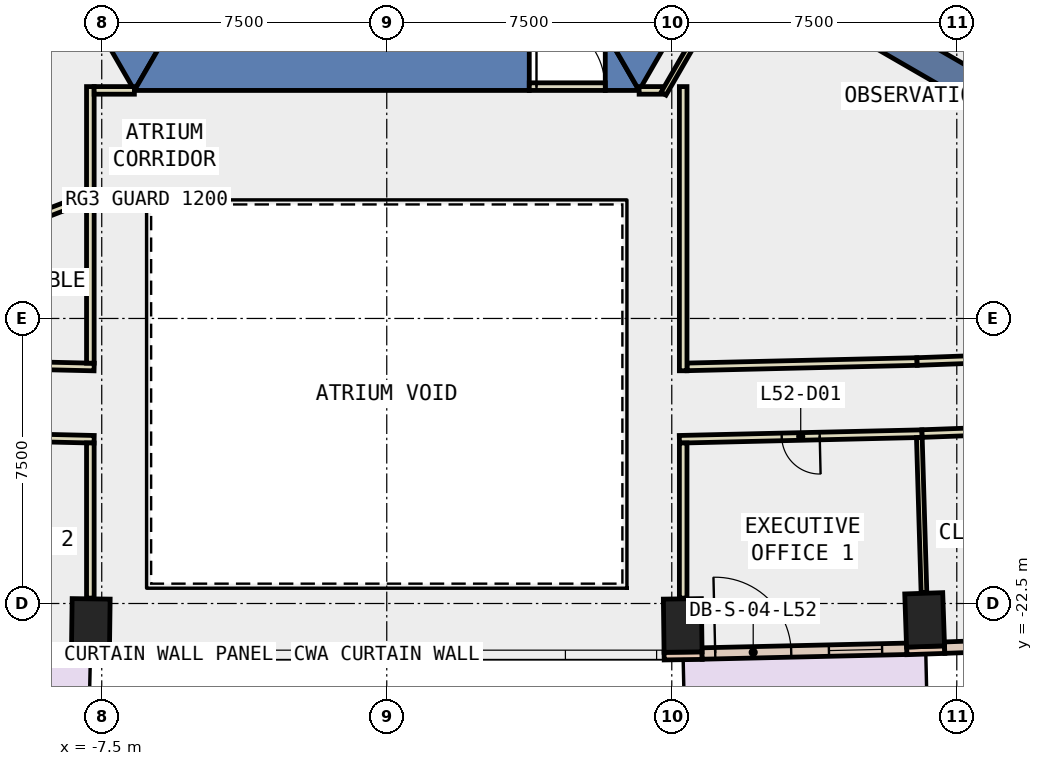
"""IFC4 building model, lengths in metres.
Left out: names, types, materials, properties, quantities, classifications, styles, units other than length and angle.
Written with IfcOpenShell. Run it as: python <this file> out.ifc"""

import sys

from ifc_helpers import new_model, si_unit, direction, frame, frame_2d, origin, origin_2d, place, context, subcontext, project, spatial, polyline, rectangle, outline, extrude, element, fill, save


model = new_model("IFC4")
c1 = context("Model", 3, precision=1e-05, world=origin(), true_north=direction((0.0, 1.0)))
c2 = subcontext(c1, "Body", "Model", "MODEL_VIEW")
j1 = project(units=[si_unit("LENGTHUNIT", "METRE"), si_unit("PLANEANGLEUNIT", "RADIAN")], contexts=[c1])
p1 = place(None, origin())
s1 = spatial("IfcSite", under=j1, at=p1, CompositionType="ELEMENT")
p2 = place(p1, origin())
s2 = spatial("IfcBuilding", under=s1, at=p2, CompositionType="ELEMENT")
p3 = place(p2, frame((0.0, 0.0, 231.8)))
s3 = spatial("IfcBuildingStorey", under=s2, at=p3, CompositionType="ELEMENT", Elevation=231.8)
for number, where, z_axis, x_axis in (
    (1, (-7.788, -23.078, -0.4), (0.0, 0.0, 1.0), (-1.0, 0.013, 0.0)),
    (2, (7.788, -23.078, -0.4), (0.0, 0.0, 1.0), (1.0, 0.013, 0.0)),
    (3, (14.154, -22.931, -0.4), (0.0, 0.0, 1.0), (0.999, 0.034, 0.0)),
):
    element("IfcColumn", number, at=place(p3, frame(where, z_axis=z_axis, x_axis=x_axis)), inside=s3, PredefinedType="COLUMN", context=c2, shape_type="SweptSolid", body=[
        extrude(rectangle(XDim=1.0, YDim=1.4, at=origin_2d()), origin(), (0.0, 0.0, 1.0), 4.0),
    ])
p4 = place(p3, frame((0.0, 0.0, -0.4)))
e4 = element("IfcWall", 4, at=p4, inside=s3, PredefinedType="SHEAR", context=c2, shape_type="SweptSolid", body=[
    extrude(outline(polyline([(-13.279, 2.5), (-6.64, -9.0), (-5.831, -7.6), (-11.662, 2.5), (-13.279, 2.5)])), origin(), (0.0, 0.0, 1.0), 4.0),
])
p5 = place(p3, frame((0.0, 0.0, -0.4)))
e5 = element("IfcWall", 5, at=p5, inside=s3, PredefinedType="SHEAR", context=c2, shape_type="SweptSolid", body=[
    extrude(outline(polyline([(3.75, -9.0), (3.75, -7.6), (-5.831, -7.6), (-6.64, -9.0), (3.75, -9.0)])), origin(), (0.0, 0.0, 1.0), 4.0),
])
p6 = place(p3, frame((0.0, 0.0, -0.4)))
e6 = element("IfcWall", 6, at=p6, inside=s3, PredefinedType="SHEAR", context=c2, shape_type="SweptSolid", body=[
    extrude(outline(polyline([(5.75, -7.6), (5.75, -9.0), (6.64, -9.0), (5.831, -7.6), (5.75, -7.6)])), origin(), (0.0, 0.0, 1.0), 4.0),
])
p7 = place(p3, frame((0.0, 0.0, -0.4)))
e7 = element("IfcWall", 7, at=p7, inside=s3, PredefinedType="SHEAR", context=c2, shape_type="SweptSolid", body=[
    extrude(outline(polyline([(6.64, -9.0), (13.279, 2.5), (11.662, 2.5), (5.831, -7.6), (6.64, -9.0)])), origin(), (0.0, 0.0, 1.0), 4.0),
])
for number, where, z_axis, x_axis in (
    (8, (8.877, -5.125, -0.4), (0.0, 0.0, 1.0), (0.866, -0.5, 0.0)),
    (9, (-8.877, -5.125, -0.4), (0.0, 0.0, 1.0), (-0.866, -0.5, 0.0)),
):
    element("IfcWall", number, at=place(p3, frame(where, z_axis=z_axis, x_axis=x_axis)), inside=s3, PredefinedType="SHEAR", context=c2, shape_type="SweptSolid", body=[
        extrude(rectangle(XDim=9.0, YDim=0.8, at=frame_2d((4.5, 0.0))), origin(), (0.0, 0.0, 1.0), 4.0),
    ])
for number, where, z_axis, x_axis in (
    (10, (-8.299, -23.871, 0.0), (0.0, 0.0, 1.0), (1.0, -0.014, 0.0)),
    (11, (7.299, -23.885, 0.0), (0.0, 0.0, 1.0), (1.0, 0.014, 0.0)),
):
    element("IfcWall", number, at=place(p3, frame(where, z_axis=z_axis, x_axis=x_axis)), inside=s3, PredefinedType="STANDARD", context=c2, shape_type="SweptSolid", body=[
        extrude(rectangle(XDim=1.0, YDim=0.2, at=frame_2d((0.5, 0.0))), origin(), (0.0, 0.0, 1.0), 3.6),
    ])
p8 = place(p3, frame((13.682, -23.747, 0.0), z_axis=(0.0, 0.0, 1.0), x_axis=(0.999415245245, 0.034193092457, 0.0)))
e12 = element("IfcWall", 12, at=p8, inside=s3, PredefinedType="STANDARD", context=c2, shape_type="SweptSolid", body=[
    extrude(rectangle(XDim=1.0, YDim=0.2, at=frame_2d((0.5, 0.0))), origin(), (0.0, 0.0, 1.0), 3.6),
])
p9 = place(p3, frame((-13.681, -23.692, 0.0), z_axis=(0.0, 0.0, 1.0), x_axis=(0.999734766333, -0.023030349233, 0.0)))
e13 = element("IfcWall", 13, at=p9, inside=s3, PredefinedType="STANDARD", context=c2, shape_type="SweptSolid", body=[
    extrude(rectangle(XDim=5.385, YDim=0.3, at=frame_2d((2.693, 0.0))), origin(), (0.0, 0.0, 1.0), 3.6),
])
p10 = place(p9, frame((0.346, 0.0, 0.0)))
e14 = element("IfcOpeningElement", 14, at=p10, cuts=e13, PredefinedType="OPENING", context=c2, shape_type="SweptSolid", body=[
    extrude(rectangle(XDim=2.0, YDim=2.4, at=frame_2d((1.0, 1.2))), frame((0.0, 0.16, 0.0), z_axis=(0.0, -1.0, 0.0), x_axis=(1.0, 0.0, 0.0)), (0.0, 0.0, 1.0), 0.32),
])
p11 = place(p9, frame((3.339, 0.0, 0.9)))
e15 = element("IfcOpeningElement", 15, at=p11, cuts=e13, PredefinedType="OPENING", context=c2, shape_type="SweptSolid", body=[
    extrude(rectangle(XDim=1.4, YDim=2.6, at=frame_2d((0.7, 1.3))), frame((0.0, 0.16, 0.0), z_axis=(0.0, -1.0, 0.0), x_axis=(1.0, 0.0, 0.0)), (0.0, 0.0, 1.0), 0.32),
])
p12 = place(p3, frame((8.297, -23.816, 0.0), z_axis=(0.0, 0.0, 1.0), x_axis=(0.999734766333, 0.023030349233, 0.0)))
e16 = element("IfcWall", 16, at=p12, inside=s3, PredefinedType="STANDARD", context=c2, shape_type="SweptSolid", body=[
    extrude(rectangle(XDim=5.385, YDim=0.3, at=frame_2d((2.693, 0.0))), origin(), (0.0, 0.0, 1.0), 3.6),
])
p13 = place(p12, frame((0.346, 0.0, 0.0)))
e17 = element("IfcOpeningElement", 17, at=p13, cuts=e16, PredefinedType="OPENING", context=c2, shape_type="SweptSolid", body=[
    extrude(rectangle(XDim=2.0, YDim=2.4, at=frame_2d((1.0, 1.2))), frame((0.0, 0.16, 0.0), z_axis=(0.0, -1.0, 0.0), x_axis=(1.0, 0.0, 0.0)), (0.0, 0.0, 1.0), 0.32),
])
p14 = place(p12, frame((3.339, 0.0, 0.9)))
e18 = element("IfcOpeningElement", 18, at=p14, cuts=e16, PredefinedType="OPENING", context=c2, shape_type="SweptSolid", body=[
    extrude(rectangle(XDim=1.4, YDim=2.6, at=frame_2d((0.7, 1.3))), frame((0.0, 0.16, 0.0), z_axis=(0.0, -1.0, 0.0), x_axis=(1.0, 0.0, 0.0)), (0.0, 0.0, 1.0), 0.32),
])
p15 = place(p3, frame((14.679, -23.662, 0.0), z_axis=(0.0, 0.0, 1.0), x_axis=(0.999318693414, 0.036907302717, 0.0)))
e19 = element("IfcWall", 19, at=p15, inside=s3, PredefinedType="STANDARD", context=c2, shape_type="SweptSolid", body=[
    extrude(rectangle(XDim=5.365, YDim=0.3, at=frame_2d((2.682, 0.0))), origin(), (0.0, 0.0, 1.0), 3.6),
])
p16 = place(p15, frame((0.641, 0.0, 0.9)))
e20 = element("IfcOpeningElement", 20, at=p16, cuts=e19, PredefinedType="OPENING", context=c2, shape_type="SweptSolid", body=[
    extrude(rectangle(XDim=1.4, YDim=2.6, at=frame_2d((0.7, 1.3))), frame((0.0, 0.16, 0.0), z_axis=(0.0, -1.0, 0.0), x_axis=(1.0, 0.0, 0.0)), (0.0, 0.0, 1.0), 0.32),
])
p17 = place(p15, frame((3.323, 0.0, 0.9)))
e21 = element("IfcOpeningElement", 21, at=p17, cuts=e19, PredefinedType="OPENING", context=c2, shape_type="SweptSolid", body=[
    extrude(rectangle(XDim=1.4, YDim=2.6, at=frame_2d((0.7, 1.3))), frame((0.0, 0.16, 0.0), z_axis=(0.0, -1.0, 0.0), x_axis=(1.0, 0.0, 0.0)), (0.0, 0.0, 1.0), 0.32),
])
p18 = place(p3, frame((7.9, -16.274, 0.0), z_axis=(0.0, 0.0, 1.0), x_axis=(0.999729409829, 0.023261709391, 0.0)))
e22 = element("IfcWall", 22, at=p18, inside=s3, PredefinedType="PARTITIONING", context=c2, shape_type="SweptSolid", body=[
    extrude(rectangle(XDim=6.056, YDim=0.2, at=frame_2d((3.028, 0.0))), origin(), (0.0, 0.0, 1.0), 3.6),
])
p19 = place(p3, frame((13.954, -16.133, 0.0), z_axis=(0.0, 0.0, 1.0), x_axis=(0.999323686931, 0.036771847101, 0.0)))
e23 = element("IfcWall", 23, at=p19, inside=s3, PredefinedType="PARTITIONING", context=c2, shape_type="SweptSolid", body=[
    extrude(rectangle(XDim=5.385, YDim=0.2, at=frame_2d((2.692, 0.0))), origin(), (0.0, 0.0, 1.0), 3.6),
])
p20 = place(p3, frame((-13.954, -16.133, 0.0), z_axis=(0.0, 0.0, 1.0), x_axis=(0.999731273021, -0.023181495732, 0.0)))
e24 = element("IfcWall", 24, at=p20, inside=s3, PredefinedType="PARTITIONING", context=c2, shape_type="SweptSolid", body=[
    extrude(rectangle(XDim=6.256, YDim=0.2, at=frame_2d((3.128, 0.0))), origin(), (0.0, 0.0, 1.0), 3.6),
])
p21 = place(p20, frame((2.628, 0.0, 0.0)))
e25 = element("IfcOpeningElement", 25, at=p21, cuts=e24, PredefinedType="OPENING", context=c2, shape_type="SweptSolid", body=[
    extrude(rectangle(XDim=1.0, YDim=2.1, at=frame_2d((0.5, 1.05))), frame((0.0, 0.11, 0.0), z_axis=(0.0, -1.0, 0.0), x_axis=(1.0, 0.0, 0.0)), (0.0, 0.0, 1.0), 0.22),
])
p22 = place(p3, frame((14.086, -18.031, 0.0), z_axis=(0.0, 0.0, 1.0), x_axis=(-0.999731734638, -0.023161579355, 0.0)))
e26 = element("IfcWall", 26, at=p22, inside=s3, PredefinedType="PARTITIONING", context=c2, shape_type="SweptSolid", body=[
    extrude(rectangle(XDim=6.388, YDim=0.2, at=frame_2d((3.194, 0.0))), origin(), (0.0, 0.0, 1.0), 3.6),
])
p23 = place(p22, frame((2.694, 0.0, 0.0)))
e27 = element("IfcOpeningElement", 27, at=p23, cuts=e26, PredefinedType="OPENING", context=c2, shape_type="SweptSolid", body=[
    extrude(rectangle(XDim=1.0, YDim=2.1, at=frame_2d((0.5, 1.05))), frame((0.0, 0.11, 0.0), z_axis=(0.0, -1.0, 0.0), x_axis=(1.0, 0.0, 0.0)), (0.0, 0.0, 1.0), 0.22),
])
p24 = place(p3, frame((19.664, -17.824, 0.0), z_axis=(0.0, 0.0, 1.0), x_axis=(-0.999324862533, -0.036739884652, 0.0)))
e28 = element("IfcWall", 28, at=p24, inside=s3, PredefinedType="PARTITIONING", context=c2, shape_type="SweptSolid", body=[
    extrude(rectangle(XDim=5.582, YDim=0.2, at=frame_2d((2.791, 0.0))), origin(), (0.0, 0.0, 1.0), 3.6),
])
p25 = place(p24, frame((2.366, 0.0, 0.0)))
e29 = element("IfcOpeningElement", 29, at=p25, cuts=e28, PredefinedType="OPENING", context=c2, shape_type="SweptSolid", body=[
    extrude(rectangle(XDim=1.0, YDim=2.1, at=frame_2d((0.5, 1.05))), frame((0.0, 0.11, 0.0), z_axis=(0.0, -1.0, 0.0), x_axis=(1.0, 0.0, 0.0)), (0.0, 0.0, 1.0), 0.22),
])
p26 = place(p3, frame((-7.7, -18.179, 0.0), z_axis=(0.0, 0.0, 1.0), x_axis=(-0.999729714353, 0.023248618029, 0.0)))
e30 = element("IfcWall", 30, at=p26, inside=s3, PredefinedType="PARTITIONING", context=c2, shape_type="SweptSolid", body=[
    extrude(rectangle(XDim=6.238, YDim=0.2, at=frame_2d((3.119, 0.0))), origin(), (0.0, 0.0, 1.0), 3.6),
])
p27 = place(p26, frame((2.694, 0.0, 0.0)))
e31 = element("IfcOpeningElement", 31, at=p27, cuts=e30, PredefinedType="OPENING", context=c2, shape_type="SweptSolid", body=[
    extrude(rectangle(XDim=1.0, YDim=2.1, at=frame_2d((0.5, 1.05))), frame((0.0, 0.11, 0.0), z_axis=(0.0, -1.0, 0.0), x_axis=(1.0, 0.0, 0.0)), (0.0, 0.0, 1.0), 0.22),
])
p28 = place(p3, frame((6.641, -8.999, 0.0), z_axis=(0.0, 0.0, 1.0), x_axis=(1.0, 0.0, 0.0)))
e32 = element("IfcWall", 32, at=p28, inside=s3, PredefinedType="PARTITIONING", context=c2, shape_type="SweptSolid", body=[
    extrude(rectangle(XDim=0.617, YDim=0.2, at=frame_2d((0.309, 0.0))), origin(), (0.0, 0.0, 1.0), 3.6),
])
p29 = place(p3, frame((7.283, -9.086, 0.0), z_axis=(0.0, 0.0, 1.0), x_axis=(0.500035303972, 0.866005020067, 0.0)))
e33 = element("IfcWall", 33, at=p29, inside=s3, PredefinedType="PARTITIONING", context=c2, shape_type="SweptSolid", body=[
    extrude(rectangle(XDim=3.828, YDim=0.15, at=frame_2d((1.914, 0.0))), origin(), (0.0, 0.0, 1.0), 3.6),
])
p30 = place(p3, frame((7.8, -8.899, 0.0), z_axis=(0.0, 0.0, 1.0), x_axis=(0.0, -1.0, 0.0)))
e34 = element("IfcWall", 34, at=p30, inside=s3, PredefinedType="PARTITIONING", context=c2, shape_type="SweptSolid", body=[
    extrude(rectangle(XDim=7.477, YDim=0.2, at=frame_2d((3.739, 0.0))), origin(), (0.0, 0.0, 1.0), 3.6),
])
p31 = place(p3, frame((-7.8, -11.69, 0.0), z_axis=(0.0, 0.0, 1.0), x_axis=(0.0, 1.0, 0.0)))
e35 = element("IfcWall", 35, at=p31, inside=s3, PredefinedType="PARTITIONING", context=c2, shape_type="SweptSolid", body=[
    extrude(rectangle(XDim=2.791, YDim=0.2, at=frame_2d((1.396, 0.0))), origin(), (0.0, 0.0, 1.0), 3.6),
])
p32 = place(p3, frame((-7.7, -8.999, 0.0), z_axis=(0.0, 0.0, 1.0), x_axis=(1.0, 0.0, 0.0)))
e36 = element("IfcWall", 36, at=p32, inside=s3, PredefinedType="PARTITIONING", context=c2, shape_type="SweptSolid", body=[
    extrude(rectangle(XDim=1.059, YDim=0.2, at=frame_2d((0.529, 0.0))), origin(), (0.0, 0.0, 1.0), 3.6),
])
p33 = place(p3, frame((-7.8, -16.176, 0.0), z_axis=(0.0, 0.0, 1.0), x_axis=(0.0, 1.0, 0.0)))
e37 = element("IfcWall", 37, at=p33, inside=s3, PredefinedType="PARTITIONING", context=c2, shape_type="SweptSolid", body=[
    extrude(rectangle(XDim=4.286, YDim=0.2, at=frame_2d((2.143, 0.0))), origin(), (0.0, 0.0, 1.0), 3.6),
])
for number, where, z_axis, x_axis in (
    (38, (7.8, -18.276, 0.0), (0.0, 0.0, 1.0), (0.0, -1.0, 0.0)),
    (39, (-7.8, -22.358, 0.0), (0.0, 0.0, 1.0), (0.0, 1.0, 0.0)),
):
    element("IfcWall", number, at=place(p3, frame(where, z_axis=z_axis, x_axis=x_axis)), inside=s3, PredefinedType="PARTITIONING", context=c2, shape_type="SweptSolid", body=[
        extrude(rectangle(XDim=4.082, YDim=0.2, at=frame_2d((2.041, 0.0))), origin(), (0.0, 0.0, 1.0), 3.6),
    ])
p34 = place(p3, frame((-7.707, -11.755, 0.0), z_axis=(0.0, 0.0, 1.0), x_axis=(-0.933420343818, -0.358784701105, 0.0)))
e40 = element("IfcWall", 40, at=p34, inside=s3, PredefinedType="PARTITIONING", context=c2, shape_type="SweptSolid", body=[
    extrude(rectangle(XDim=8.501, YDim=0.2, at=frame_2d((4.25, 0.0))), origin(), (0.0, 0.0, 1.0), 3.6),
])
p35 = place(p3, frame((14.014, -18.132, 0.0), z_axis=(0.0, 0.0, 1.0), x_axis=(0.029914181802, -0.999552470722, 0.0)))
e41 = element("IfcWall", 41, at=p35, inside=s3, PredefinedType="PARTITIONING", context=c2, shape_type="SweptSolid", body=[
    extrude(rectangle(XDim=4.081, YDim=0.15, at=frame_2d((2.04, 0.0))), origin(), (0.0, 0.0, 1.0), 3.6),
])
p36 = place(p3, frame((3.75, -8.9, 0.0), z_axis=(0.0, 0.0, 1.0), x_axis=(1.0, 0.0, 0.0)))
e42 = element("IfcWall", 42, at=p36, inside=s3, PredefinedType="PARTITIONING", context=c2, shape_type="SweptSolid", body=[
    extrude(rectangle(XDim=2.0, YDim=0.2, at=frame_2d((1.0, 0.0))), origin(), (0.0, 0.0, 1.0), 2.4),
])
p37 = place(p36, frame((0.19, 0.0, 0.0)))
e43 = element("IfcOpeningElement", 43, at=p37, cuts=e42, PredefinedType="OPENING", context=c2, shape_type="SweptSolid", body=[
    extrude(rectangle(XDim=1.8, YDim=2.1, at=frame_2d((0.9, 1.05))), frame((0.0, 0.11, 0.0), z_axis=(0.0, -1.0, 0.0), x_axis=(1.0, 0.0, 0.0)), (0.0, 0.0, 1.0), 0.22),
])
p38 = place(p13, origin())
e44 = element("IfcDoor", 44, at=p38, inside=s3, OperationType="SLIDING_TO_LEFT", PredefinedType="DOOR", context=c2, shape_type="SweptSolid", body=[
    extrude(rectangle(XDim=2.0, YDim=2.4, at=frame_2d((1.0, 1.2))), frame((0.0, 0.025, 0.0), z_axis=(0.0, -1.0, 0.0), x_axis=(1.0, 0.0, 0.0)), (0.0, 0.0, 1.0), 0.05),
])
fill(e17, e44)
p39 = place(p14, origin())
e45 = element("IfcWindow", 45, at=p39, inside=s3, PartitioningType="SINGLE_PANEL", PredefinedType="WINDOW", context=c2, shape_type="SweptSolid", body=[
    extrude(rectangle(XDim=1.4, YDim=2.6, at=frame_2d((0.7, 1.3))), frame((0.0, 0.03, 0.0), z_axis=(0.0, -1.0, 0.0), x_axis=(1.0, 0.0, 0.0)), (0.0, 0.0, 1.0), 0.06),
])
fill(e18, e45)
p40 = place(p23, origin())
e46 = element("IfcDoor", 46, at=p40, inside=s3, OperationType="SINGLE_SWING_LEFT", PredefinedType="DOOR", context=c2, shape_type="SweptSolid", body=[
    extrude(rectangle(XDim=1.0, YDim=2.1, at=frame_2d((0.5, 1.05))), frame((0.0, 0.025, 0.0), z_axis=(0.0, -1.0, 0.0), x_axis=(1.0, 0.0, 0.0)), (0.0, 0.0, 1.0), 0.05),
])
fill(e27, e46)
p41 = place(p37, origin())
e47 = element("IfcDoor", 47, at=p41, inside=s3, OperationType="DOUBLE_DOOR_SINGLE_SWING", PredefinedType="DOOR", context=c2, shape_type="SweptSolid", body=[
    extrude(rectangle(XDim=1.8, YDim=2.1, at=frame_2d((0.9, 1.05))), frame((0.0, 0.025, 0.0), z_axis=(0.0, -1.0, 0.0), x_axis=(1.0, 0.0, 0.0)), (0.0, 0.0, 1.0), 0.05),
])
fill(e43, e47)
save(model, sys.argv[1])
